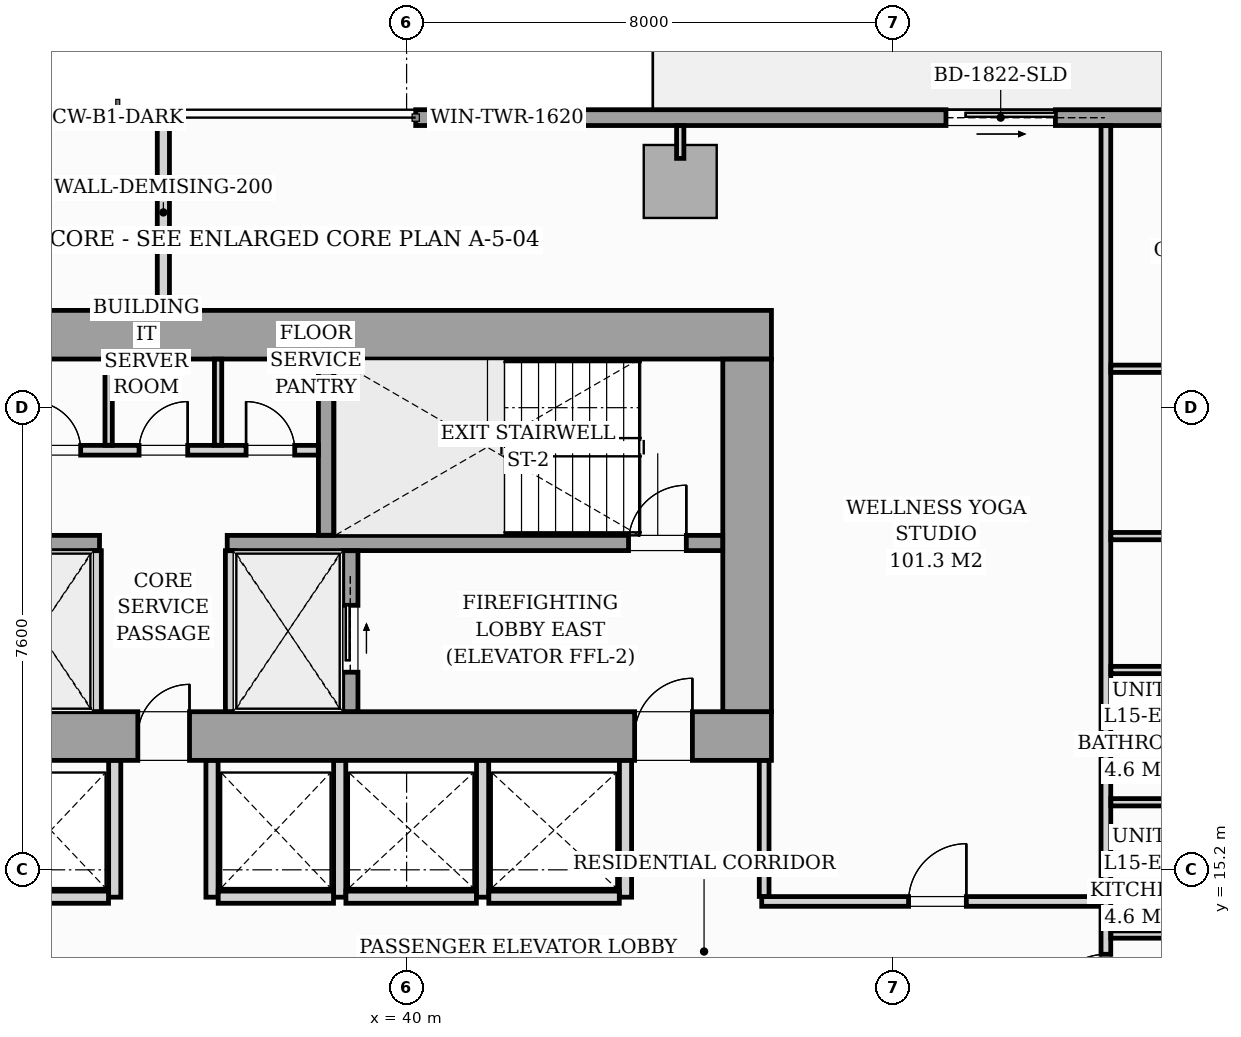
"""IFC4 building model, lengths in metres.
Left out: names, types, materials, properties, quantities, classifications, styles, units other than length and angle.
Written with IfcOpenShell. Run it as: python <this file> out.ifc"""

import sys

from ifc_helpers import new_model, si_unit, direction, frame, frame_2d, origin, origin_2d, place, context, subcontext, project, spatial, rectangle, i_section, extrude, source, transform, mapped, element, fill, save


model = new_model("IFC4")
c1 = context("Model", 3, precision=1e-05, world=origin(), true_north=direction((0.0, 1.0)))
c2 = subcontext(c1, "Body", "Model", "MODEL_VIEW")
j1 = project(units=[si_unit("LENGTHUNIT", "METRE"), si_unit("PLANEANGLEUNIT", "RADIAN")], contexts=[c1])
p1 = place(None, origin())
s1 = spatial("IfcSite", under=j1, at=p1, CompositionType="ELEMENT")
p2 = place(p1, origin())
s2 = spatial("IfcBuilding", under=s1, at=p2, CompositionType="ELEMENT")
p3 = place(p2, frame((0.0, 0.0, 55.0)))
s3 = spatial("IfcBuildingStorey", under=s2, at=p3, CompositionType="ELEMENT", Elevation=55.0)
m1 = source(origin(), c2, "Body", "SweptSolid", [
    extrude(i_section(OverallWidth=0.437, OverallDepth=0.514, WebThickness=0.061, FlangeThickness=0.097, FilletRadius=0.018, at=origin_2d()), origin(), (0.0, 0.0, 1.0), 3.196),
])
for number, where, z_axis, x_axis in (
    (1, (38.88, 17.4, 0.002), (0.0, 0.0, 1.0), (1.0, 0.0, 0.0)),
    (2, (45.6, 17.4, 0.002), (0.0, 0.0, 1.0), (1.0, 0.0, 0.0)),
    (3, (38.88, 24.0, 0.002), (0.0, 0.0, 1.0), (1.0, 0.0, 0.0)),
    (4, (45.6, 24.0, 0.002), (0.0, 0.0, 1.0), (1.0, 0.0, 0.0)),
):
    element("IfcColumn", number, at=place(p3, frame(where, z_axis=z_axis, x_axis=x_axis)), inside=s3, PredefinedType="PILASTER", context=c2, shape_type="MappedRepresentation", body=[
        mapped(m1, transform((0.0, 0.0, 0.0), scale=1.0)),
    ])
m2 = source(origin(), c2, "Body", "SweptSolid", [
    extrude(rectangle(XDim=1.2, YDim=1.2, at=origin_2d()), origin(), (0.0, 0.0, 1.0), 3.196),
])
p4 = place(p3, frame((44.5, 26.52, 0.002), z_axis=(0.0, 0.0, 1.0), x_axis=(1.0, 0.0, 0.0)))
e5 = element("IfcColumn", 5, at=p4, inside=s3, PredefinedType="COLUMN", context=c2, shape_type="MappedRepresentation", body=[
    mapped(m2, transform((0.0, 0.0, 0.0), scale=1.0)),
])
p5 = place(p3, frame((40.15, 27.57, 0.0), z_axis=(0.0, 0.0, 1.0), x_axis=(1.0, 0.0, 0.0)))
e6 = element("IfcWall", 6, at=p5, inside=s3, PredefinedType="STANDARD", context=c2, shape_type="SweptSolid", body=[
    extrude(rectangle(XDim=17.15, YDim=0.26, at=frame_2d((8.575, 0.0))), origin(), (0.0, 0.0, 1.0), 2.94),
])
p6 = place(p5, frame((8.72, 0.0, 0.0)))
e7 = element("IfcOpeningElement", 7, at=p6, cuts=e6, PredefinedType="OPENING", context=c2, shape_type="SweptSolid", body=[
    extrude(rectangle(XDim=1.8, YDim=2.06, at=frame_2d((0.9, 1.03))), frame((0.0, 0.14, 0.0), z_axis=(0.0, -1.0, 0.0), x_axis=(1.0, 0.0, 0.0)), (0.0, 0.0, 1.0), 0.28),
])
p7 = place(p5, frame((0.7, 0.0, 0.65)))
e8 = element("IfcOpeningElement", 8, at=p7, cuts=e6, PredefinedType="OPENING", context=c2, shape_type="SweptSolid", body=[
    extrude(rectangle(XDim=1.6, YDim=1.5, at=frame_2d((0.8, 0.75))), frame((0.0, 0.14, 0.0), z_axis=(0.0, -1.0, 0.0), x_axis=(1.0, 0.0, 0.0)), (0.0, 0.0, 1.0), 0.28),
])
p8 = place(p3, frame((26.0, 17.4, 0.0), z_axis=(0.0, 0.0, 1.0), x_axis=(1.0, 0.0, 0.0)))
e9 = element("IfcWall", 9, at=p8, inside=s3, PredefinedType="SHEAR", context=c2, shape_type="SweptSolid", body=[
    extrude(rectangle(XDim=20.0, YDim=0.8, at=frame_2d((10.0, 0.0))), origin(), (0.0, 0.0, 1.0), 3.2),
])
p9 = place(p8, frame((1.15, 0.0, 0.0)))
e10 = element("IfcOpeningElement", 10, at=p9, cuts=e9, PredefinedType="OPENING", context=c2, shape_type="SweptSolid", body=[
    extrude(rectangle(XDim=0.95, YDim=2.06, at=frame_2d((0.475, 1.03))), frame((0.0, 0.41, 0.0), z_axis=(0.0, -1.0, 0.0), x_axis=(1.0, 0.0, 0.0)), (0.0, 0.0, 1.0), 0.82),
])
p10 = place(p8, frame((9.58, 0.0, 0.0)))
e11 = element("IfcOpeningElement", 11, at=p10, cuts=e9, PredefinedType="OPENING", context=c2, shape_type="SweptSolid", body=[
    extrude(rectangle(XDim=0.85, YDim=2.0, at=frame_2d((0.425, 1.0))), frame((0.0, 0.41, 0.0), z_axis=(0.0, -1.0, 0.0), x_axis=(1.0, 0.0, 0.0)), (0.0, 0.0, 1.0), 0.82),
])
p11 = place(p8, frame((17.75, 0.0, 0.0)))
e12 = element("IfcOpeningElement", 12, at=p11, cuts=e9, PredefinedType="OPENING", context=c2, shape_type="SweptSolid", body=[
    extrude(rectangle(XDim=0.95, YDim=2.06, at=frame_2d((0.475, 1.03))), frame((0.0, 0.41, 0.0), z_axis=(0.0, -1.0, 0.0), x_axis=(1.0, 0.0, 0.0)), (0.0, 0.0, 1.0), 0.82),
])
p12 = place(p3, frame((26.0, 24.0, 0.0), z_axis=(0.0, 0.0, 1.0), x_axis=(1.0, 0.0, 0.0)))
e13 = element("IfcWall", 13, at=p12, inside=s3, PredefinedType="SHEAR", context=c2, shape_type="SweptSolid", body=[
    extrude(rectangle(XDim=20.0, YDim=0.8, at=frame_2d((10.0, 0.0))), origin(), (0.0, 0.0, 1.0), 3.2),
])
p13 = place(p3, frame((45.6, 17.802, 0.0), z_axis=(0.0, 0.0, 1.0), x_axis=(0.0, 1.0, 0.0)))
e14 = element("IfcWall", 14, at=p13, inside=s3, PredefinedType="SHEAR", context=c2, shape_type="SweptSolid", body=[
    extrude(rectangle(XDim=5.796, YDim=0.8, at=frame_2d((2.898, 0.0))), origin(), (0.0, 0.0, 1.0), 3.2),
])
p14 = place(p3, frame((26.802, 20.575, 0.0), z_axis=(0.0, 0.0, 1.0), x_axis=(1.0, 0.0, 0.0)))
e15 = element("IfcWall", 15, at=p14, inside=s3, PredefinedType="SOLIDWALL", context=c2, shape_type="SweptSolid", body=[
    extrude(rectangle(XDim=8.148, YDim=0.25, at=frame_2d((4.074, 0.0))), origin(), (0.0, 0.0, 1.0), 3.2),
])
p15 = place(p14, frame((0.398, 0.0, 0.0)))
e16 = element("IfcOpeningElement", 16, at=p15, cuts=e15, PredefinedType="OPENING", context=c2, shape_type="SweptSolid", body=[
    extrude(rectangle(XDim=0.95, YDim=2.06, at=frame_2d((0.475, 1.03))), frame((0.0, 0.135, 0.0), z_axis=(0.0, -1.0, 0.0), x_axis=(1.0, 0.0, 0.0)), (0.0, 0.0, 1.0), 0.27),
])
p16 = place(p3, frame((37.05, 20.575, 0.0), z_axis=(0.0, 0.0, 1.0), x_axis=(1.0, 0.0, 0.0)))
e17 = element("IfcWall", 17, at=p16, inside=s3, PredefinedType="SOLIDWALL", context=c2, shape_type="SweptSolid", body=[
    extrude(rectangle(XDim=8.148, YDim=0.25, at=frame_2d((4.074, 0.0))), origin(), (0.0, 0.0, 1.0), 3.2),
])
p17 = place(p16, frame((6.6, 0.0, 0.0)))
e18 = element("IfcOpeningElement", 18, at=p17, cuts=e17, PredefinedType="OPENING", context=c2, shape_type="SweptSolid", body=[
    extrude(rectangle(XDim=0.95, YDim=2.06, at=frame_2d((0.475, 1.03))), frame((0.0, 0.135, 0.0), z_axis=(0.0, -1.0, 0.0), x_axis=(1.0, 0.0, 0.0)), (0.0, 0.0, 1.0), 0.27),
])
p18 = place(p3, frame((38.675, 20.702, 0.0), z_axis=(0.0, 0.0, 1.0), x_axis=(0.0, 1.0, 0.0)))
e19 = element("IfcWall", 19, at=p18, inside=s3, PredefinedType="SOLIDWALL", context=c2, shape_type="SweptSolid", body=[
    extrude(rectangle(XDim=2.896, YDim=0.25, at=frame_2d((1.448, 0.0))), origin(), (0.0, 0.0, 1.0), 3.2),
])
for number, where, z_axis, x_axis in (
    (20, (34.9, 17.802, 0.0), (0.0, 0.0, 1.0), (0.0, 1.0, 0.0)),
    (21, (37.1, 17.802, 0.0), (0.0, 0.0, 1.0), (0.0, 1.0, 0.0)),
):
    element("IfcWall", number, at=place(p3, frame(where, z_axis=z_axis, x_axis=x_axis)), inside=s3, PredefinedType="PARTITIONING", context=c2, shape_type="SweptSolid", body=[
        extrude(rectangle(XDim=2.646, YDim=0.16, at=frame_2d((1.323, 0.0))), origin(), (0.0, 0.0, 1.0), 2.94),
    ])
p19 = place(p3, frame((39.075, 17.802, 0.0), z_axis=(0.0, 0.0, 1.0), x_axis=(0.0, 1.0, 0.0)))
e22 = element("IfcWall", 22, at=p19, inside=s3, PredefinedType="SOLIDWALL", context=c2, shape_type="SweptSolid", body=[
    extrude(rectangle(XDim=2.646, YDim=0.25, at=frame_2d((1.323, 0.0))), origin(), (0.0, 0.0, 1.0), 3.2),
])
p20 = place(p19, frame((0.648, 0.0, 0.0)))
e23 = element("IfcOpeningElement", 23, at=p20, cuts=e22, PredefinedType="OPENING", context=c2, shape_type="SweptSolid", body=[
    extrude(rectangle(XDim=1.1, YDim=2.08, at=frame_2d((0.55, 1.04))), frame((0.0, 0.135, 0.0), z_axis=(0.0, -1.0, 0.0), x_axis=(1.0, 0.0, 0.0)), (0.0, 0.0, 1.0), 0.27),
])
p21 = place(p3, frame((33.452, 22.1, 0.0), z_axis=(0.0, 0.0, 1.0), x_axis=(1.0, 0.0, 0.0)))
e24 = element("IfcWall", 24, at=p21, inside=s3, PredefinedType="PARTITIONING", context=c2, shape_type="SweptSolid", body=[
    extrude(rectangle(XDim=5.096, YDim=0.16, at=frame_2d((2.548, 0.0))), origin(), (0.0, 0.0, 1.0), 2.94),
])
p22 = place(p21, frame((0.388, 0.0, 0.0)))
e25 = element("IfcOpeningElement", 25, at=p22, cuts=e24, PredefinedType="OPENING", context=c2, shape_type="SweptSolid", body=[
    extrude(rectangle(XDim=0.8, YDim=2.05, at=frame_2d((0.4, 1.025))), frame((0.0, 0.09, 0.0), z_axis=(0.0, -1.0, 0.0), x_axis=(1.0, 0.0, 0.0)), (0.0, 0.0, 1.0), 0.18),
])
p23 = place(p21, frame((2.148, 0.0, 0.0)))
e26 = element("IfcOpeningElement", 26, at=p23, cuts=e24, PredefinedType="OPENING", context=c2, shape_type="SweptSolid", body=[
    extrude(rectangle(XDim=0.8, YDim=2.05, at=frame_2d((0.4, 1.025))), frame((0.0, 0.09, 0.0), z_axis=(0.0, -1.0, 0.0), x_axis=(1.0, 0.0, 0.0)), (0.0, 0.0, 1.0), 0.18),
])
p24 = place(p21, frame((3.908, 0.0, 0.0)))
e27 = element("IfcOpeningElement", 27, at=p24, cuts=e24, PredefinedType="OPENING", context=c2, shape_type="SweptSolid", body=[
    extrude(rectangle(XDim=0.8, YDim=2.05, at=frame_2d((0.4, 1.025))), frame((0.0, 0.09, 0.0), z_axis=(0.0, -1.0, 0.0), x_axis=(1.0, 0.0, 0.0)), (0.0, 0.0, 1.0), 0.18),
])
for number, where, z_axis, x_axis in (
    (28, (35.1, 22.182, 0.0), (0.0, 0.0, 1.0), (0.0, 1.0, 0.0)),
    (29, (36.9, 22.182, 0.0), (0.0, 0.0, 1.0), (0.0, 1.0, 0.0)),
):
    element("IfcWall", number, at=place(p3, frame(where, z_axis=z_axis, x_axis=x_axis)), inside=s3, PredefinedType="PARTITIONING", context=c2, shape_type="SweptSolid", body=[
        extrude(rectangle(XDim=1.416, YDim=0.12, at=frame_2d((0.708, 0.0))), origin(), (0.0, 0.0, 1.0), 2.94),
    ])
p25 = place(p3, frame((35.2, 14.75, 0.0), z_axis=(0.0, 0.0, 1.0), x_axis=(0.0, 1.0, 0.0)))
e30 = element("IfcWall", 30, at=p25, inside=s3, PredefinedType="PARTITIONING", context=c2, shape_type="SweptSolid", body=[
    extrude(rectangle(XDim=2.248, YDim=0.2, at=frame_2d((1.124, 0.0))), origin(), (0.0, 0.0, 1.0), 2.94),
])
p26 = place(p3, frame((33.202, 14.75, 0.0), z_axis=(0.0, 0.0, 1.0), x_axis=(1.0, 0.0, 0.0)))
e31 = element("IfcWall", 31, at=p26, inside=s3, PredefinedType="PARTITIONING", context=c2, shape_type="SweptSolid", body=[
    extrude(rectangle(XDim=1.896, YDim=0.2, at=frame_2d((0.948, 0.0))), origin(), (0.0, 0.0, 1.0), 2.94),
])
for number, where, z_axis, x_axis in (
    (32, (36.8, 14.75, 0.0), (0.0, 0.0, 1.0), (0.0, 1.0, 0.0)),
    (33, (38.9, 14.75, 0.0), (0.0, 0.0, 1.0), (0.0, 1.0, 0.0)),
):
    element("IfcWall", number, at=place(p3, frame(where, z_axis=z_axis, x_axis=x_axis)), inside=s3, PredefinedType="PARTITIONING", context=c2, shape_type="SweptSolid", body=[
        extrude(rectangle(XDim=2.248, YDim=0.2, at=frame_2d((1.124, 0.0))), origin(), (0.0, 0.0, 1.0), 2.94),
    ])
p27 = place(p3, frame((36.902, 14.75, 0.0), z_axis=(0.0, 0.0, 1.0), x_axis=(1.0, 0.0, 0.0)))
e34 = element("IfcWall", 34, at=p27, inside=s3, PredefinedType="PARTITIONING", context=c2, shape_type="SweptSolid", body=[
    extrude(rectangle(XDim=1.896, YDim=0.2, at=frame_2d((0.948, 0.0))), origin(), (0.0, 0.0, 1.0), 2.94),
])
for number, where, z_axis, x_axis in (
    (35, (41.25, 14.75, 0.0), (0.0, 0.0, 1.0), (0.0, 1.0, 0.0)),
    (36, (43.6, 14.75, 0.0), (0.0, 0.0, 1.0), (0.0, 1.0, 0.0)),
):
    element("IfcWall", number, at=place(p3, frame(where, z_axis=z_axis, x_axis=x_axis)), inside=s3, PredefinedType="PARTITIONING", context=c2, shape_type="SweptSolid", body=[
        extrude(rectangle(XDim=2.248, YDim=0.2, at=frame_2d((1.124, 0.0))), origin(), (0.0, 0.0, 1.0), 2.94),
    ])
for number, where, z_axis, x_axis in (
    (37, (39.002, 14.75, 0.0), (0.0, 0.0, 1.0), (1.0, 0.0, 0.0)),
    (38, (41.352, 14.75, 0.0), (0.0, 0.0, 1.0), (1.0, 0.0, 0.0)),
):
    element("IfcWall", number, at=place(p3, frame(where, z_axis=z_axis, x_axis=x_axis)), inside=s3, PredefinedType="PARTITIONING", context=c2, shape_type="SweptSolid", body=[
        extrude(rectangle(XDim=2.146, YDim=0.2, at=frame_2d((1.073, 0.0))), origin(), (0.0, 0.0, 1.0), 2.94),
    ])
p28 = place(p3, frame((51.5, 12.432, 0.0), z_axis=(0.0, 0.0, 1.0), x_axis=(0.0, 1.0, 0.0)))
e39 = element("IfcWall", 39, at=p28, inside=s3, PredefinedType="PARTITIONING", context=c2, shape_type="SweptSolid", body=[
    extrude(rectangle(XDim=15.006, YDim=0.16, at=frame_2d((7.503, 0.0))), origin(), (0.0, 0.0, 1.0), 2.94),
])
p29 = place(p28, frame((0.429, 0.0, 0.0)))
e40 = element("IfcOpeningElement", 40, at=p29, cuts=e39, PredefinedType="OPENING", context=c2, shape_type="SweptSolid", body=[
    extrude(rectangle(XDim=0.95, YDim=2.06, at=frame_2d((0.475, 1.03))), frame((0.0, 0.09, 0.0), z_axis=(0.0, -1.0, 0.0), x_axis=(1.0, 0.0, 0.0)), (0.0, 0.0, 1.0), 0.18),
])
p30 = place(p3, frame((36.0, 24.402, 0.0), z_axis=(0.0, 0.0, 1.0), x_axis=(0.0, 1.0, 0.0)))
e41 = element("IfcWall", 41, at=p30, inside=s3, PredefinedType="PARTITIONING", context=c2, shape_type="SweptSolid", body=[
    extrude(rectangle(XDim=3.218, YDim=0.2, at=frame_2d((1.609, 0.0))), origin(), (0.0, 0.0, 1.0), 2.94),
])
p31 = place(p3, frame((51.582, 16.311, 0.0), z_axis=(0.0, 0.0, 1.0), x_axis=(1.0, 0.0, 0.0)))
e42 = element("IfcWall", 42, at=p31, inside=s3, PredefinedType="PARTITIONING", context=c2, shape_type="SweptSolid", body=[
    extrude(rectangle(XDim=2.256, YDim=0.12, at=frame_2d((1.128, 0.0))), origin(), (0.0, 0.0, 1.0), 2.045),
])
for number, where, z_axis, x_axis in (
    (43, (51.582, 14.136, 0.0), (0.0, 0.0, 1.0), (1.0, 0.0, 0.0)),
    (44, (51.582, 18.486, 0.0), (0.0, 0.0, 1.0), (1.0, 0.0, 0.0)),
):
    element("IfcWall", number, at=place(p3, frame(where, z_axis=z_axis, x_axis=x_axis)), inside=s3, PredefinedType="PARTITIONING", context=c2, shape_type="SweptSolid", body=[
        extrude(rectangle(XDim=2.256, YDim=0.12, at=frame_2d((1.128, 0.0))), origin(), (0.0, 0.0, 1.0), 2.94),
    ])
p32 = place(p3, frame((51.582, 23.44, 0.0), z_axis=(0.0, 0.0, 1.0), x_axis=(1.0, 0.0, 0.0)))
e45 = element("IfcWall", 45, at=p32, inside=s3, PredefinedType="PARTITIONING", context=c2, shape_type="SweptSolid", body=[
    extrude(rectangle(XDim=8.138, YDim=0.12, at=frame_2d((4.069, 0.0))), origin(), (0.0, 0.0, 1.0), 2.94),
])
p33 = place(p32, frame((3.653, 0.0, 0.0)))
e46 = element("IfcOpeningElement", 46, at=p33, cuts=e45, PredefinedType="OPENING", context=c2, shape_type="SweptSolid", body=[
    extrude(rectangle(XDim=0.85, YDim=2.05, at=frame_2d((0.425, 1.025))), frame((0.0, 0.07, 0.0), z_axis=(0.0, -1.0, 0.0), x_axis=(1.0, 0.0, 0.0)), (0.0, 0.0, 1.0), 0.14),
])
p34 = place(p3, frame((51.582, 20.688, 0.0), z_axis=(0.0, 0.0, 1.0), x_axis=(1.0, 0.0, 0.0)))
e47 = element("IfcWall", 47, at=p34, inside=s3, PredefinedType="PARTITIONING", context=c2, shape_type="SweptSolid", body=[
    extrude(rectangle(XDim=8.138, YDim=0.12, at=frame_2d((4.069, 0.0))), origin(), (0.0, 0.0, 1.0), 2.94),
])
p35 = place(p34, frame((3.653, 0.0, 0.0)))
e48 = element("IfcOpeningElement", 48, at=p35, cuts=e47, PredefinedType="OPENING", context=c2, shape_type="SweptSolid", body=[
    extrude(rectangle(XDim=0.85, YDim=2.05, at=frame_2d((0.425, 1.025))), frame((0.0, 0.07, 0.0), z_axis=(0.0, -1.0, 0.0), x_axis=(1.0, 0.0, 0.0)), (0.0, 0.0, 1.0), 0.14),
])
p36 = place(p3, frame((45.84, 14.68, 0.0), z_axis=(0.0, 0.0, 1.0), x_axis=(1.0, 0.0, 0.0)))
e49 = element("IfcWall", 49, at=p36, inside=s3, PredefinedType="PARTITIONING", context=c2, shape_type="SweptSolid", body=[
    extrude(rectangle(XDim=5.578, YDim=0.16, at=frame_2d((2.789, 0.0))), origin(), (0.0, 0.0, 1.0), 2.94),
])
p37 = place(p36, frame((2.415, 0.0, 0.0)))
e50 = element("IfcOpeningElement", 50, at=p37, cuts=e49, PredefinedType="OPENING", context=c2, shape_type="SweptSolid", body=[
    extrude(rectangle(XDim=0.95, YDim=2.06, at=frame_2d((0.475, 1.03))), frame((0.0, 0.09, 0.0), z_axis=(0.0, -1.0, 0.0), x_axis=(1.0, 0.0, 0.0)), (0.0, 0.0, 1.0), 0.18),
])
p38 = place(p3, frame((45.88, 14.762, 0.0), z_axis=(0.0, 0.0, 1.0), x_axis=(0.0, 1.0, 0.0)))
e51 = element("IfcWall", 51, at=p38, inside=s3, PredefinedType="PARTITIONING", context=c2, shape_type="SweptSolid", body=[
    extrude(rectangle(XDim=2.236, YDim=0.16, at=frame_2d((1.118, 0.0))), origin(), (0.0, 0.0, 1.0), 2.94),
])
p39 = place(p3, frame((44.5, 26.9, 0.0), z_axis=(0.0, 0.0, 1.0), x_axis=(0.0, 1.0, 0.0)))
e52 = element("IfcWall", 52, at=p39, inside=s3, PredefinedType="PARTITIONING", context=c2, shape_type="SweptSolid", body=[
    extrude(rectangle(XDim=0.538, YDim=0.12, at=frame_2d((0.269, 0.0))), origin(), (0.0, 0.0, 1.0), 2.94),
])
m3 = source(origin(), c2, "Body", "SweptSolid", [
    extrude(rectangle(XDim=1.8, YDim=2.06, at=frame_2d((0.9, 1.03))), frame((0.0, 0.025, 0.0), z_axis=(0.0, -1.0, 0.0), x_axis=(1.0, 0.0, 0.0)), (0.0, 0.0, 1.0), 0.05),
])
p40 = place(p6, origin())
e53 = element("IfcDoor", 53, at=p40, inside=s3, OperationType="SLIDING_TO_RIGHT", PredefinedType="DOOR", context=c2, shape_type="MappedRepresentation", body=[
    mapped(m3, transform((0.0, 0.0, 0.0), scale=1.0)),
])
fill(e7, e53)
m4 = source(origin(), c2, "Body", "SweptSolid", [
    extrude(rectangle(XDim=1.6, YDim=1.5, at=frame_2d((0.8, 0.75))), frame((0.0, 0.03, 0.0), z_axis=(0.0, -1.0, 0.0), x_axis=(1.0, 0.0, 0.0)), (0.0, 0.0, 1.0), 0.06),
])
p41 = place(p7, origin())
e54 = element("IfcWindow", 54, at=p41, inside=s3, PartitioningType="SINGLE_PANEL", PredefinedType="WINDOW", context=c2, shape_type="MappedRepresentation", body=[
    mapped(m4, transform((0.0, 0.0, 0.0), scale=1.0)),
])
fill(e8, e54)
m5 = source(origin(), c2, "Body", "SweptSolid", [
    extrude(rectangle(XDim=0.85, YDim=2.0, at=frame_2d((0.425, 1.0))), frame((0.0, 0.025, 0.0), z_axis=(0.0, -1.0, 0.0), x_axis=(1.0, 0.0, 0.0)), (0.0, 0.0, 1.0), 0.05),
])
p42 = place(p10, origin())
e55 = element("IfcDoor", 55, at=p42, inside=s3, OperationType="SINGLE_SWING_RIGHT", PredefinedType="DOOR", context=c2, shape_type="MappedRepresentation", body=[
    mapped(m5, transform((0.0, 0.0, 0.0), scale=1.0)),
])
fill(e11, e55)
m6 = source(origin(), c2, "Body", "SweptSolid", [
    extrude(rectangle(XDim=0.95, YDim=2.06, at=frame_2d((0.475, 1.03))), frame((0.0, 0.025, 0.0), z_axis=(0.0, -1.0, 0.0), x_axis=(1.0, 0.0, 0.0)), (0.0, 0.0, 1.0), 0.05),
])
p43 = place(p11, origin())
e56 = element("IfcDoor", 56, at=p43, inside=s3, OperationType="SINGLE_SWING_RIGHT", PredefinedType="DOOR", context=c2, shape_type="MappedRepresentation", body=[
    mapped(m6, transform((0.0, 0.0, 0.0), scale=1.0)),
])
fill(e12, e56)
p44 = place(p17, origin())
e57 = element("IfcDoor", 57, at=p44, inside=s3, OperationType="SINGLE_SWING_RIGHT", PredefinedType="DOOR", context=c2, shape_type="MappedRepresentation", body=[
    mapped(m6, transform((0.0, 0.0, 0.0), scale=1.0)),
])
fill(e18, e57)
m7 = source(origin(), c2, "Body", "SweptSolid", [
    extrude(rectangle(XDim=1.1, YDim=2.08, at=frame_2d((0.55, 1.04))), frame((0.0, 0.025, 0.0), z_axis=(0.0, -1.0, 0.0), x_axis=(1.0, 0.0, 0.0)), (0.0, 0.0, 1.0), 0.05),
])
p45 = place(p20, origin())
e58 = element("IfcDoor", 58, at=p45, inside=s3, OperationType="SLIDING_TO_RIGHT", PredefinedType="DOOR", context=c2, shape_type="MappedRepresentation", body=[
    mapped(m7, transform((0.0, 0.0, 0.0), scale=1.0)),
])
fill(e23, e58)
m8 = source(origin(), c2, "Body", "SweptSolid", [
    extrude(rectangle(XDim=0.8, YDim=2.05, at=frame_2d((0.4, 1.025))), frame((0.0, 0.025, 0.0), z_axis=(0.0, -1.0, 0.0), x_axis=(1.0, 0.0, 0.0)), (0.0, 0.0, 1.0), 0.05),
])
p46 = place(p22, origin())
e59 = element("IfcDoor", 59, at=p46, inside=s3, OperationType="SINGLE_SWING_LEFT", PredefinedType="DOOR", context=c2, shape_type="MappedRepresentation", body=[
    mapped(m8, transform((0.0, 0.0, 0.0), scale=1.0)),
])
fill(e25, e59)
p47 = place(p23, origin())
e60 = element("IfcDoor", 60, at=p47, inside=s3, OperationType="SINGLE_SWING_RIGHT", PredefinedType="DOOR", context=c2, shape_type="MappedRepresentation", body=[
    mapped(m8, transform((0.0, 0.0, 0.0), scale=1.0)),
])
fill(e26, e60)
p48 = place(p24, origin())
e61 = element("IfcDoor", 61, at=p48, inside=s3, OperationType="SINGLE_SWING_LEFT", PredefinedType="DOOR", context=c2, shape_type="MappedRepresentation", body=[
    mapped(m8, transform((0.0, 0.0, 0.0), scale=1.0)),
])
fill(e27, e61)
m9 = source(origin(), c2, "Body", "SweptSolid", [
    extrude(rectangle(XDim=0.95, YDim=2.06, at=frame_2d((0.475, 1.03))), frame((0.0, 0.025, 0.0), z_axis=(0.0, -1.0, 0.0), x_axis=(1.0, 0.0, 0.0)), (0.0, 0.0, 1.0), 0.05),
])
p49 = place(p29, origin())
e62 = element("IfcDoor", 62, at=p49, inside=s3, OperationType="SINGLE_SWING_LEFT", PredefinedType="DOOR", context=c2, shape_type="MappedRepresentation", body=[
    mapped(m9, transform((0.0, 0.0, 0.0), scale=1.0)),
])
fill(e40, e62)
p50 = place(p37, origin())
e63 = element("IfcDoor", 63, at=p50, inside=s3, OperationType="SINGLE_SWING_RIGHT", PredefinedType="DOOR", context=c2, shape_type="MappedRepresentation", body=[
    mapped(m9, transform((0.0, 0.0, 0.0), scale=1.0)),
])
fill(e50, e63)
save(model, sys.argv[1])
